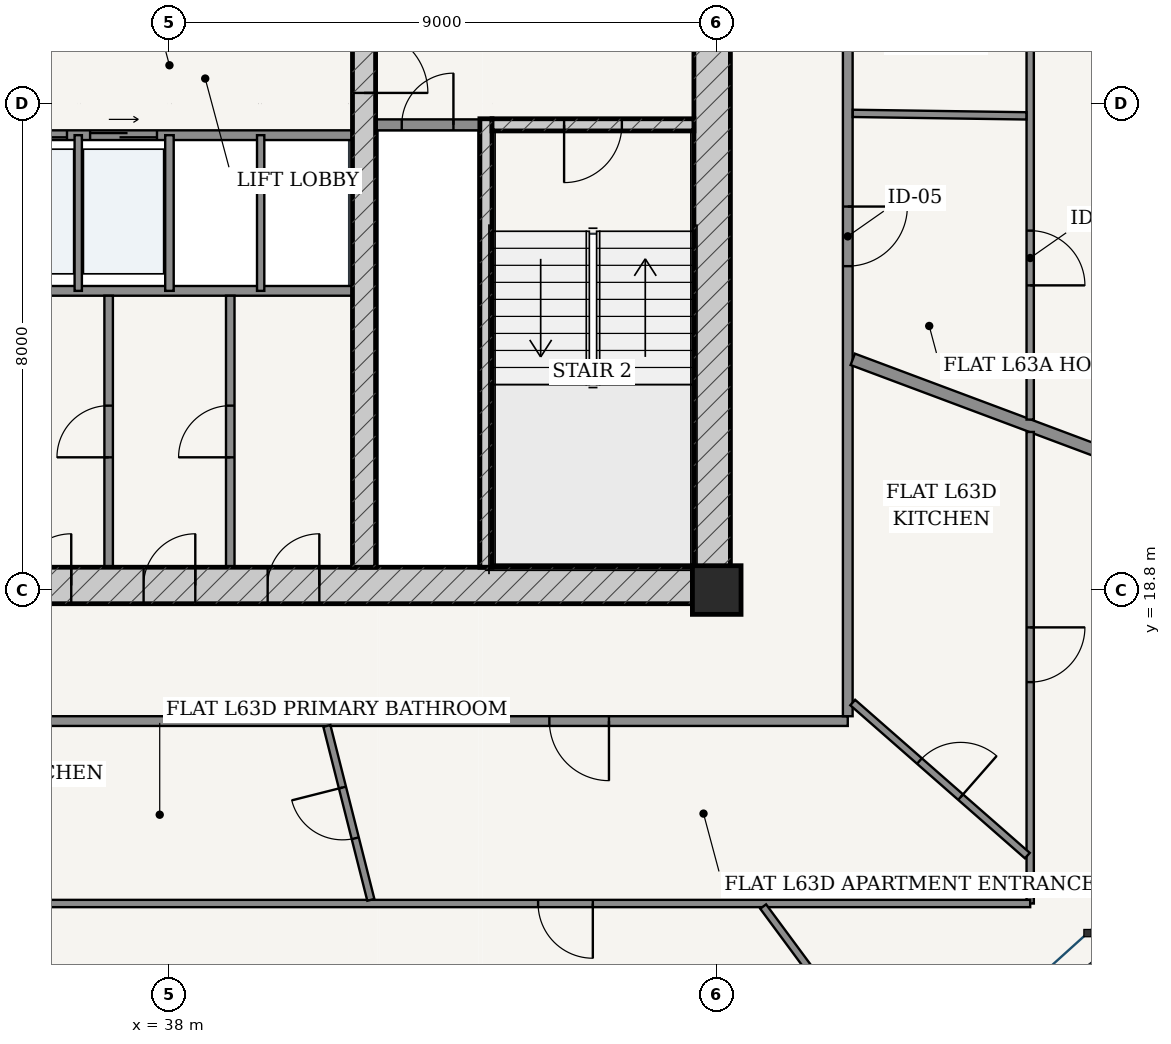
"""IFC4 building model, lengths in metres.
Left out: names, types, materials, properties, quantities, classifications, styles, units other than length and angle.
Written with IfcOpenShell. Run it as: python <this file> out.ifc"""

import sys

from ifc_helpers import new_model, si_unit, direction, frame, frame_2d, origin, origin_2d, place, context, subcontext, project, spatial, rectangle, extrude, source, transform, mapped, element, fill, save


model = new_model("IFC4")
c1 = context("Model", 3, precision=1e-05, world=origin(), true_north=direction((-0.2419218956, 0.970295726276)))
c2 = subcontext(c1, "Body", "Model", "MODEL_VIEW")
j1 = project(units=[si_unit("LENGTHUNIT", "METRE"), si_unit("PLANEANGLEUNIT", "RADIAN")], contexts=[c1])
p1 = place(None, origin())
s1 = spatial("IfcSite", under=j1, at=p1, CompositionType="ELEMENT")
p2 = place(p1, origin())
s2 = spatial("IfcBuilding", under=s1, at=p2, CompositionType="ELEMENT")
p3 = place(p2, frame((0.0, 0.0, 239.3)))
s3 = spatial("IfcBuildingStorey", under=s2, at=p3, CompositionType="ELEMENT", Elevation=239.3)
p4 = place(p3, frame((47.0, 18.8, 0.0), z_axis=(0.0, 0.0, 1.0), x_axis=(1.0, 0.0, 0.0)))
e1 = element("IfcColumn", 1, at=p4, inside=s3, PredefinedType="COLUMN", context=c2, shape_type="SweptSolid", body=[
    extrude(rectangle(XDim=0.8, YDim=0.8, at=origin_2d()), origin(), (0.0, 0.0, 1.0), 3.7),
])
p5 = place(p3, frame((28.775, 18.875, 0.0), z_axis=(0.0, 0.0, 1.0), x_axis=(1.0, 0.0, 0.0)))
e2 = element("IfcWall", 2, at=p5, inside=s3, PredefinedType="SHEAR", context=c2, shape_type="SweptSolid", body=[
    extrude(rectangle(XDim=18.45, YDim=0.6, at=frame_2d((9.225, 0.0))), origin(), (0.0, 0.0, 1.0), 3.25),
])
p6 = place(p5, frame((6.76, 0.0, 0.0)))
e3 = element("IfcOpeningElement", 3, at=p6, cuts=e2, PredefinedType="OPENING", context=c2, shape_type="SweptSolid", body=[
    extrude(rectangle(XDim=0.85, YDim=2.1, at=frame_2d((0.425, 1.05))), frame((0.0, 0.31, 0.0), z_axis=(0.0, -1.0, 0.0), x_axis=(1.0, 0.0, 0.0)), (0.0, 0.0, 1.0), 0.62),
])
p7 = place(p5, frame((8.8, 0.0, 0.0)))
e4 = element("IfcOpeningElement", 4, at=p7, cuts=e2, PredefinedType="OPENING", context=c2, shape_type="SweptSolid", body=[
    extrude(rectangle(XDim=0.85, YDim=2.1, at=frame_2d((0.425, 1.05))), frame((0.0, 0.31, 0.0), z_axis=(0.0, -1.0, 0.0), x_axis=(1.0, 0.0, 0.0)), (0.0, 0.0, 1.0), 0.62),
])
p8 = place(p5, frame((10.84, 0.0, 0.0)))
e5 = element("IfcOpeningElement", 5, at=p8, cuts=e2, PredefinedType="OPENING", context=c2, shape_type="SweptSolid", body=[
    extrude(rectangle(XDim=0.85, YDim=2.1, at=frame_2d((0.425, 1.05))), frame((0.0, 0.31, 0.0), z_axis=(0.0, -1.0, 0.0), x_axis=(1.0, 0.0, 0.0)), (0.0, 0.0, 1.0), 0.62),
])
p9 = place(p3, frame((46.925, 19.175, 0.0), z_axis=(0.0, 0.0, 1.0), x_axis=(0.0, 1.0, 0.0)))
e6 = element("IfcWall", 6, at=p9, inside=s3, PredefinedType="SHEAR", context=c2, shape_type="SweptSolid", body=[
    extrude(rectangle(XDim=15.25, YDim=0.6, at=frame_2d((7.625, 0.0))), origin(), (0.0, 0.0, 1.0), 3.25),
])
p10 = place(p9, frame((9.875, 0.0, 0.0)))
e7 = element("IfcOpeningElement", 7, at=p10, cuts=e6, PredefinedType="OPENING", context=c2, shape_type="SweptSolid", body=[
    extrude(rectangle(XDim=1.5, YDim=2.2, at=frame_2d((0.75, 1.1))), frame((0.0, 0.31, 0.0), z_axis=(0.0, -1.0, 0.0), x_axis=(1.0, 0.0, 0.0)), (0.0, 0.0, 1.0), 0.62),
])
p11 = place(p3, frame((43.205, 19.175, 0.0), z_axis=(0.0, 0.0, 1.0), x_axis=(0.0, 1.0, 0.0)))
e8 = element("IfcWall", 8, at=p11, inside=s3, PredefinedType="SOLIDWALL", context=c2, shape_type="SweptSolid", body=[
    extrude(rectangle(XDim=7.375, YDim=0.2, at=frame_2d((3.688, 0.0))), origin(), (0.0, 0.0, 1.0), 3.25),
])
p12 = place(p3, frame((43.305, 26.45, 0.0), z_axis=(0.0, 0.0, 1.0), x_axis=(1.0, 0.0, 0.0)))
e9 = element("IfcWall", 9, at=p12, inside=s3, PredefinedType="SOLIDWALL", context=c2, shape_type="SweptSolid", body=[
    extrude(rectangle(XDim=3.32, YDim=0.2, at=frame_2d((1.66, 0.0))), origin(), (0.0, 0.0, 1.0), 3.25),
])
p13 = place(p12, frame((1.185, 0.0, 0.0)))
e10 = element("IfcOpeningElement", 10, at=p13, cuts=e9, PredefinedType="OPENING", context=c2, shape_type="SweptSolid", body=[
    extrude(rectangle(XDim=0.95, YDim=2.15, at=frame_2d((0.475, 1.075))), frame((0.0, 0.11, 0.0), z_axis=(0.0, -1.0, 0.0), x_axis=(1.0, 0.0, 0.0)), (0.0, 0.0, 1.0), 0.22),
])
p14 = place(p3, frame((41.2, 19.175, 0.0), z_axis=(0.0, 0.0, 1.0), x_axis=(0.0, 1.0, 0.0)))
e11 = element("IfcWall", 11, at=p14, inside=s3, PredefinedType="SHEAR", context=c2, shape_type="SweptSolid", body=[
    extrude(rectangle(XDim=15.25, YDim=0.38, at=frame_2d((7.625, 0.0))), origin(), (0.0, 0.0, 1.0), 3.25),
])
p15 = place(p14, frame((7.8, 0.0, 0.0)))
e12 = element("IfcOpeningElement", 12, at=p15, cuts=e11, PredefinedType="OPENING", context=c2, shape_type="SweptSolid", body=[
    extrude(rectangle(XDim=1.05, YDim=2.15, at=frame_2d((0.525, 1.075))), frame((0.0, 0.2, 0.0), z_axis=(0.0, -1.0, 0.0), x_axis=(1.0, 0.0, 0.0)), (0.0, 0.0, 1.0), 0.4),
])
p16 = place(p3, frame((41.39, 26.45, 0.0), z_axis=(0.0, 0.0, 1.0), x_axis=(1.0, 0.0, 0.0)))
e13 = element("IfcWall", 13, at=p16, inside=s3, PredefinedType="PARTITIONING", context=c2, shape_type="SweptSolid", body=[
    extrude(rectangle(XDim=1.71, YDim=0.18, at=frame_2d((0.855, 0.0))), origin(), (0.0, 0.0, 1.0), 3.25),
])
p17 = place(p16, frame((0.43, 0.0, 0.0)))
e14 = element("IfcOpeningElement", 14, at=p17, cuts=e13, PredefinedType="OPENING", context=c2, shape_type="SweptSolid", body=[
    extrude(rectangle(XDim=0.85, YDim=2.1, at=frame_2d((0.425, 1.05))), frame((0.0, 0.1, 0.0), z_axis=(0.0, -1.0, 0.0), x_axis=(1.0, 0.0, 0.0)), (0.0, 0.0, 1.0), 0.2),
])
p18 = place(p3, frame((34.99, 26.28, 0.0), z_axis=(0.0, 0.0, 1.0), x_axis=(1.0, 0.0, 0.0)))
e15 = element("IfcWall", 15, at=p18, inside=s3, PredefinedType="PARTITIONING", context=c2, shape_type="SweptSolid", body=[
    extrude(rectangle(XDim=6.02, YDim=0.16, at=frame_2d((3.01, 0.0))), origin(), (0.0, 0.0, 1.0), 3.25),
])
p19 = place(p18, frame((0.225, 0.0, 0.0)))
e16 = element("IfcOpeningElement", 16, at=p19, cuts=e15, PredefinedType="OPENING", context=c2, shape_type="SweptSolid", body=[
    extrude(rectangle(XDim=1.1, YDim=2.2, at=frame_2d((0.55, 1.1))), frame((0.0, 0.09, 0.0), z_axis=(0.0, -1.0, 0.0), x_axis=(1.0, 0.0, 0.0)), (0.0, 0.0, 1.0), 0.18),
])
p20 = place(p18, frame((1.705, 0.0, 0.0)))
e17 = element("IfcOpeningElement", 17, at=p20, cuts=e15, PredefinedType="OPENING", context=c2, shape_type="SweptSolid", body=[
    extrude(rectangle(XDim=1.1, YDim=2.2, at=frame_2d((0.55, 1.1))), frame((0.0, 0.09, 0.0), z_axis=(0.0, -1.0, 0.0), x_axis=(1.0, 0.0, 0.0)), (0.0, 0.0, 1.0), 0.18),
])
p21 = place(p3, frame((34.99, 23.72, 0.0), z_axis=(0.0, 0.0, 1.0), x_axis=(1.0, 0.0, 0.0)))
e18 = element("IfcWall", 18, at=p21, inside=s3, PredefinedType="PARTITIONING", context=c2, shape_type="SweptSolid", body=[
    extrude(rectangle(XDim=6.02, YDim=0.16, at=frame_2d((3.01, 0.0))), origin(), (0.0, 0.0, 1.0), 3.25),
])
p22 = place(p3, frame((36.5, 23.72, 0.0), z_axis=(0.0, 0.0, 1.0), x_axis=(0.0, 1.0, 0.0)))
e19 = element("IfcWall", 19, at=p22, inside=s3, PredefinedType="PARTITIONING", context=c2, shape_type="SweptSolid", body=[
    extrude(rectangle(XDim=2.56, YDim=0.12, at=frame_2d((1.28, 0.0))), origin(), (0.0, 0.0, 1.0), 3.25),
])
p23 = place(p3, frame((38.0, 23.72, 0.0), z_axis=(0.0, 0.0, 1.0), x_axis=(0.0, 1.0, 0.0)))
e20 = element("IfcWall", 20, at=p23, inside=s3, PredefinedType="PARTITIONING", context=c2, shape_type="SweptSolid", body=[
    extrude(rectangle(XDim=2.56, YDim=0.14, at=frame_2d((1.28, 0.0))), origin(), (0.0, 0.0, 1.0), 3.25),
])
p24 = place(p3, frame((39.5, 23.72, 0.0), z_axis=(0.0, 0.0, 1.0), x_axis=(0.0, 1.0, 0.0)))
e21 = element("IfcWall", 21, at=p24, inside=s3, PredefinedType="PARTITIONING", context=c2, shape_type="SweptSolid", body=[
    extrude(rectangle(XDim=2.56, YDim=0.12, at=frame_2d((1.28, 0.0))), origin(), (0.0, 0.0, 1.0), 3.25),
])
p25 = place(p3, frame((37.0, 19.175, 0.0), z_axis=(0.0, 0.0, 1.0), x_axis=(0.0, 1.0, 0.0)))
e22 = element("IfcWall", 22, at=p25, inside=s3, PredefinedType="PARTITIONING", context=c2, shape_type="SweptSolid", body=[
    extrude(rectangle(XDim=4.465, YDim=0.14, at=frame_2d((2.232, 0.0))), origin(), (0.0, 0.0, 1.0), 3.25),
])
p26 = place(p25, frame((1.808, 0.0, 0.0)))
e23 = element("IfcOpeningElement", 23, at=p26, cuts=e22, PredefinedType="OPENING", context=c2, shape_type="SweptSolid", body=[
    extrude(rectangle(XDim=0.85, YDim=2.1, at=frame_2d((0.425, 1.05))), frame((0.0, 0.08, 0.0), z_axis=(0.0, -1.0, 0.0), x_axis=(1.0, 0.0, 0.0)), (0.0, 0.0, 1.0), 0.16),
])
p27 = place(p3, frame((39.0, 19.175, 0.0), z_axis=(0.0, 0.0, 1.0), x_axis=(0.0, 1.0, 0.0)))
e24 = element("IfcWall", 24, at=p27, inside=s3, PredefinedType="PARTITIONING", context=c2, shape_type="SweptSolid", body=[
    extrude(rectangle(XDim=4.465, YDim=0.14, at=frame_2d((2.232, 0.0))), origin(), (0.0, 0.0, 1.0), 3.25),
])
p28 = place(p27, frame((1.808, 0.0, 0.0)))
e25 = element("IfcOpeningElement", 25, at=p28, cuts=e24, PredefinedType="OPENING", context=c2, shape_type="SweptSolid", body=[
    extrude(rectangle(XDim=0.85, YDim=2.1, at=frame_2d((0.425, 1.05))), frame((0.0, 0.08, 0.0), z_axis=(0.0, -1.0, 0.0), x_axis=(1.0, 0.0, 0.0)), (0.0, 0.0, 1.0), 0.16),
])
p29 = place(p3, frame((34.32, 16.645, 0.0), z_axis=(0.0, 0.0, 1.0), x_axis=(1.0, 0.0, 0.0)))
e26 = element("IfcWall", 26, at=p29, inside=s3, PredefinedType="PARTITIONING", context=c2, shape_type="SweptSolid", body=[
    extrude(rectangle(XDim=14.835, YDim=0.16, at=frame_2d((7.417, 0.0))), origin(), (0.0, 0.0, 1.0), 2.775),
])
p30 = place(p29, frame((9.928, 0.0, 0.0)))
e27 = element("IfcOpeningElement", 27, at=p30, cuts=e26, PredefinedType="OPENING", context=c2, shape_type="SweptSolid", body=[
    extrude(rectangle(XDim=0.98, YDim=2.2, at=frame_2d((0.49, 1.1))), frame((0.0, 0.09, 0.0), z_axis=(0.0, -1.0, 0.0), x_axis=(1.0, 0.0, 0.0)), (0.0, 0.0, 1.0), 0.18),
])
p31 = place(p3, frame((49.155, 16.725, 0.0), z_axis=(0.0, 0.0, 1.0), x_axis=(0.0, 1.0, 0.0)))
e28 = element("IfcWall", 28, at=p31, inside=s3, PredefinedType="PARTITIONING", context=c2, shape_type="SweptSolid", body=[
    extrude(rectangle(XDim=18.3, YDim=0.16, at=frame_2d((9.15, 0.0))), origin(), (0.0, 0.0, 1.0), 2.775),
])
p32 = place(p31, frame((7.401, 0.0, 0.0)))
e29 = element("IfcOpeningElement", 29, at=p32, cuts=e28, PredefinedType="OPENING", context=c2, shape_type="SweptSolid", body=[
    extrude(rectangle(XDim=0.98, YDim=2.2, at=frame_2d((0.49, 1.1))), frame((0.0, 0.09, 0.0), z_axis=(0.0, -1.0, 0.0), x_axis=(1.0, 0.0, 0.0)), (0.0, 0.0, 1.0), 0.18),
])
p33 = place(p3, frame((49.237, 22.594, 0.0), z_axis=(0.0, 0.0, 1.0), x_axis=(0.936534016635, -0.350576718687, 0.0)))
e30 = element("IfcWall", 30, at=p33, inside=s3, PredefinedType="PARTITIONING", context=c2, shape_type="SweptSolid", body=[
    extrude(rectangle(XDim=9.446, YDim=0.2, at=frame_2d((4.723, 0.0))), origin(), (0.0, 0.0, 1.0), 2.881),
])
p34 = place(p3, frame((52.155, 38.105, 0.0), z_axis=(0.0, 0.0, 1.0), x_axis=(0.0, -1.0, 0.0)))
e31 = element("IfcWall", 31, at=p34, inside=s3, PredefinedType="PARTITIONING", context=c2, shape_type="SweptSolid", body=[
    extrude(rectangle(XDim=16.501, YDim=0.12, at=frame_2d((8.251, 0.0))), origin(), (0.0, 0.0, 1.0), 2.775),
])
p35 = place(p34, frame((13.395, 0.0, 0.0)))
e32 = element("IfcOpeningElement", 32, at=p35, cuts=e31, PredefinedType="OPENING", context=c2, shape_type="SweptSolid", body=[
    extrude(rectangle(XDim=0.9, YDim=2.15, at=frame_2d((0.45, 1.075))), frame((0.0, 0.07, 0.0), z_axis=(0.0, -1.0, 0.0), x_axis=(1.0, 0.0, 0.0)), (0.0, 0.0, 1.0), 0.14),
])
p36 = place(p34, frame((7.467, 0.0, 0.0)))
e33 = element("IfcOpeningElement", 33, at=p36, cuts=e31, PredefinedType="OPENING", context=c2, shape_type="SweptSolid", body=[
    extrude(rectangle(XDim=0.9, YDim=2.15, at=frame_2d((0.45, 1.075))), frame((0.0, 0.07, 0.0), z_axis=(0.0, -1.0, 0.0), x_axis=(1.0, 0.0, 0.0)), (0.0, 0.0, 1.0), 0.14),
])
p37 = place(p3, frame((49.237, 26.639, 0.0), z_axis=(0.0, 0.0, 1.0), x_axis=(0.999896890624, -0.014359948506, 0.0)))
e34 = element("IfcWall", 34, at=p37, inside=s3, PredefinedType="PARTITIONING", context=c2, shape_type="SweptSolid", body=[
    extrude(rectangle(XDim=2.856, YDim=0.12, at=frame_2d((1.428, 0.0))), origin(), (0.0, 0.0, 1.0), 2.969),
])
p38 = place(p3, frame((52.155, 21.4, 0.0), z_axis=(0.0, 0.0, 1.0), x_axis=(0.0, -1.0, 0.0)))
e35 = element("IfcWall", 35, at=p38, inside=s3, PredefinedType="PARTITIONING", context=c2, shape_type="SweptSolid", body=[
    extrude(rectangle(XDim=7.755, YDim=0.12, at=frame_2d((3.877, 0.0))), origin(), (0.0, 0.0, 1.0), 2.775),
])
p39 = place(p38, frame((3.214, 0.0, 0.0)))
e36 = element("IfcOpeningElement", 36, at=p39, cuts=e35, PredefinedType="OPENING", context=c2, shape_type="SweptSolid", body=[
    extrude(rectangle(XDim=0.9, YDim=2.15, at=frame_2d((0.45, 1.075))), frame((0.0, 0.07, 0.0), z_axis=(0.0, -1.0, 0.0), x_axis=(1.0, 0.0, 0.0)), (0.0, 0.0, 1.0), 0.14),
])
p40 = place(p3, frame((52.155, 13.645, 0.0), z_axis=(0.0, 0.0, 1.0), x_axis=(-1.0, 0.0, 0.0)))
e37 = element("IfcWall", 37, at=p40, inside=s3, PredefinedType="PARTITIONING", context=c2, shape_type="SweptSolid", body=[
    extrude(rectangle(XDim=16.949, YDim=0.12, at=frame_2d((8.474, 0.0))), origin(), (0.0, 0.0, 1.0), 2.775),
])
p41 = place(p40, frame((7.192, 0.0, 0.0)))
e38 = element("IfcOpeningElement", 38, at=p41, cuts=e37, PredefinedType="OPENING", context=c2, shape_type="SweptSolid", body=[
    extrude(rectangle(XDim=0.9, YDim=2.15, at=frame_2d((0.45, 1.075))), frame((0.0, 0.07, 0.0), z_axis=(0.0, -1.0, 0.0), x_axis=(1.0, 0.0, 0.0)), (0.0, 0.0, 1.0), 0.14),
])
p42 = place(p3, frame((47.764, 13.595, 0.0), z_axis=(0.0, 0.0, 1.0), x_axis=(0.594530312724, -0.804073197696, 0.0)))
e39 = element("IfcWall", 39, at=p42, inside=s3, PredefinedType="PARTITIONING", context=c2, shape_type="SweptSolid", body=[
    extrude(rectangle(XDim=3.845, YDim=0.12, at=frame_2d((1.922, 0.0))), origin(), (0.0, 0.0, 1.0), 2.6),
])
p43 = place(p3, frame((40.589, 16.565, 0.0), z_axis=(0.0, 0.0, 1.0), x_axis=(0.245222005641, -0.969466950416, 0.0)))
e40 = element("IfcWall", 40, at=p43, inside=s3, PredefinedType="PARTITIONING", context=c2, shape_type="SweptSolid", body=[
    extrude(rectangle(XDim=2.95, YDim=0.12, at=frame_2d((1.475, 0.0))), origin(), (0.0, 0.0, 1.0), 2.969),
])
p44 = place(p43, frame((1.045, 0.0, 0.0)))
e41 = element("IfcOpeningElement", 41, at=p44, cuts=e40, PredefinedType="OPENING", context=c2, shape_type="SweptSolid", body=[
    extrude(rectangle(XDim=0.86, YDim=2.15, at=frame_2d((0.43, 1.075))), frame((0.0, 0.07, 0.0), z_axis=(0.0, -1.0, 0.0), x_axis=(1.0, 0.0, 0.0)), (0.0, 0.0, 1.0), 0.14),
])
p45 = place(p3, frame((49.237, 16.95, 0.0), z_axis=(0.0, 0.0, 1.0), x_axis=(0.751994252696, -0.659169662463, 0.0)))
e42 = element("IfcWall", 42, at=p45, inside=s3, PredefinedType="PARTITIONING", context=c2, shape_type="SweptSolid", body=[
    extrude(rectangle(XDim=3.819, YDim=0.12, at=frame_2d((1.909, 0.0))), origin(), (0.0, 0.0, 1.0), 2.881),
])
p46 = place(p45, frame((1.459, 0.0, 0.0)))
e43 = element("IfcOpeningElement", 43, at=p46, cuts=e42, PredefinedType="OPENING", context=c2, shape_type="SweptSolid", body=[
    extrude(rectangle(XDim=0.9, YDim=2.15, at=frame_2d((0.45, 1.075))), frame((0.0, 0.07, 0.0), z_axis=(0.0, -1.0, 0.0), x_axis=(1.0, 0.0, 0.0)), (0.0, 0.0, 1.0), 0.14),
])
m1 = source(origin(), c2, "Body", "SweptSolid", [
    extrude(rectangle(XDim=1.05, YDim=2.15, at=frame_2d((0.525, 1.075))), frame((0.0, 0.025, 0.0), z_axis=(0.0, -1.0, 0.0), x_axis=(1.0, 0.0, 0.0)), (0.0, 0.0, 1.0), 0.05),
])
p47 = place(p15, frame((1.05, 0.0, 0.0), z_axis=(0.0, 0.0, 1.0), x_axis=(-1.0, 0.0, 0.0)))
e44 = element("IfcDoor", 44, at=p47, inside=s3, OperationType="SINGLE_SWING_RIGHT", PredefinedType="DOOR", context=c2, shape_type="MappedRepresentation", body=[
    mapped(m1, transform((0.0, 0.0, 0.0), scale=1.0)),
])
fill(e12, e44)
m2 = source(origin(), c2, "Body", "SweptSolid", [
    extrude(rectangle(XDim=0.95, YDim=2.15, at=frame_2d((0.475, 1.075))), frame((0.0, 0.025, 0.0), z_axis=(0.0, -1.0, 0.0), x_axis=(1.0, 0.0, 0.0)), (0.0, 0.0, 1.0), 0.05),
])
p48 = place(p13, frame((0.95, 0.0, 0.0), z_axis=(0.0, 0.0, 1.0), x_axis=(-1.0, 0.0, 0.0)))
e45 = element("IfcDoor", 45, at=p48, inside=s3, OperationType="SINGLE_SWING_RIGHT", PredefinedType="DOOR", context=c2, shape_type="MappedRepresentation", body=[
    mapped(m2, transform((0.0, 0.0, 0.0), scale=1.0)),
])
fill(e10, e45)
m3 = source(origin(), c2, "Body", "SweptSolid", [
    extrude(rectangle(XDim=0.85, YDim=2.1, at=frame_2d((0.425, 1.05))), frame((0.0, 0.025, 0.0), z_axis=(0.0, -1.0, 0.0), x_axis=(1.0, 0.0, 0.0)), (0.0, 0.0, 1.0), 0.05),
])
p49 = place(p17, origin())
e46 = element("IfcDoor", 46, at=p49, inside=s3, OperationType="SINGLE_SWING_RIGHT", PredefinedType="DOOR", context=c2, shape_type="MappedRepresentation", body=[
    mapped(m3, transform((0.0, 0.0, 0.0), scale=1.0)),
])
fill(e14, e46)
p50 = place(p6, origin())
e47 = element("IfcDoor", 47, at=p50, inside=s3, OperationType="SINGLE_SWING_RIGHT", PredefinedType="DOOR", context=c2, shape_type="MappedRepresentation", body=[
    mapped(m3, transform((0.0, 0.0, 0.0), scale=1.0)),
])
fill(e3, e47)
p51 = place(p7, origin())
e48 = element("IfcDoor", 48, at=p51, inside=s3, OperationType="SINGLE_SWING_RIGHT", PredefinedType="DOOR", context=c2, shape_type="MappedRepresentation", body=[
    mapped(m3, transform((0.0, 0.0, 0.0), scale=1.0)),
])
fill(e4, e48)
p52 = place(p8, origin())
e49 = element("IfcDoor", 49, at=p52, inside=s3, OperationType="SINGLE_SWING_RIGHT", PredefinedType="DOOR", context=c2, shape_type="MappedRepresentation", body=[
    mapped(m3, transform((0.0, 0.0, 0.0), scale=1.0)),
])
fill(e5, e49)
p53 = place(p26, origin())
e50 = element("IfcDoor", 50, at=p53, inside=s3, OperationType="SINGLE_SWING_LEFT", PredefinedType="DOOR", context=c2, shape_type="MappedRepresentation", body=[
    mapped(m3, transform((0.0, 0.0, 0.0), scale=1.0)),
])
fill(e23, e50)
p54 = place(p28, origin())
e51 = element("IfcDoor", 51, at=p54, inside=s3, OperationType="SINGLE_SWING_LEFT", PredefinedType="DOOR", context=c2, shape_type="MappedRepresentation", body=[
    mapped(m3, transform((0.0, 0.0, 0.0), scale=1.0)),
])
fill(e25, e51)
m4 = source(origin(), c2, "Body", "SweptSolid", [
    extrude(rectangle(XDim=1.1, YDim=2.2, at=frame_2d((0.55, 1.1))), frame((0.0, 0.025, 0.0), z_axis=(0.0, -1.0, 0.0), x_axis=(1.0, 0.0, 0.0)), (0.0, 0.0, 1.0), 0.05),
])
p55 = place(p19, origin())
e52 = element("IfcDoor", 52, at=p55, inside=s3, OperationType="DOUBLE_DOOR_SLIDING", PredefinedType="DOOR", context=c2, shape_type="MappedRepresentation", body=[
    mapped(m4, transform((0.0, 0.0, 0.0), scale=1.0)),
])
fill(e16, e52)
p56 = place(p20, origin())
e53 = element("IfcDoor", 53, at=p56, inside=s3, OperationType="DOUBLE_DOOR_SLIDING", PredefinedType="DOOR", context=c2, shape_type="MappedRepresentation", body=[
    mapped(m4, transform((0.0, 0.0, 0.0), scale=1.0)),
])
fill(e17, e53)
m5 = source(origin(), c2, "Body", "SweptSolid", [
    extrude(rectangle(XDim=0.98, YDim=2.2, at=frame_2d((0.49, 1.1))), frame((0.0, 0.025, 0.0), z_axis=(0.0, -1.0, 0.0), x_axis=(1.0, 0.0, 0.0)), (0.0, 0.0, 1.0), 0.05),
])
p57 = place(p32, frame((0.98, 0.0, 0.0), z_axis=(0.0, 0.0, 1.0), x_axis=(-1.0, 0.0, 0.0)))
e54 = element("IfcDoor", 54, at=p57, inside=s3, OperationType="SINGLE_SWING_LEFT", PredefinedType="DOOR", context=c2, shape_type="MappedRepresentation", body=[
    mapped(m5, transform((0.0, 0.0, 0.0), scale=1.0)),
])
fill(e29, e54)
m6 = source(origin(), c2, "Body", "SweptSolid", [
    extrude(rectangle(XDim=0.9, YDim=2.15, at=frame_2d((0.45, 1.075))), frame((0.0, 0.025, 0.0), z_axis=(0.0, -1.0, 0.0), x_axis=(1.0, 0.0, 0.0)), (0.0, 0.0, 1.0), 0.05),
])
p58 = place(p35, origin())
e55 = element("IfcDoor", 55, at=p58, inside=s3, OperationType="SINGLE_SWING_RIGHT", PredefinedType="DOOR", context=c2, shape_type="MappedRepresentation", body=[
    mapped(m6, transform((0.0, 0.0, 0.0), scale=1.0)),
])
fill(e32, e55)
p59 = place(p30, frame((0.98, 0.0, 0.0), z_axis=(0.0, 0.0, 1.0), x_axis=(-1.0, 0.0, 0.0)))
e56 = element("IfcDoor", 56, at=p59, inside=s3, OperationType="SINGLE_SWING_LEFT", PredefinedType="DOOR", context=c2, shape_type="MappedRepresentation", body=[
    mapped(m5, transform((0.0, 0.0, 0.0), scale=1.0)),
])
fill(e27, e56)
m7 = source(origin(), c2, "Body", "SweptSolid", [
    extrude(rectangle(XDim=0.86, YDim=2.15, at=frame_2d((0.43, 1.075))), frame((0.0, 0.025, 0.0), z_axis=(0.0, -1.0, 0.0), x_axis=(1.0, 0.0, 0.0)), (0.0, 0.0, 1.0), 0.05),
])
p60 = place(p44, frame((0.86, 0.0, 0.0), z_axis=(0.0, 0.0, 1.0), x_axis=(-1.0, 0.0, 0.0)))
e57 = element("IfcDoor", 57, at=p60, inside=s3, OperationType="SINGLE_SWING_RIGHT", PredefinedType="DOOR", context=c2, shape_type="MappedRepresentation", body=[
    mapped(m7, transform((0.0, 0.0, 0.0), scale=1.0)),
])
fill(e41, e57)
p61 = place(p41, origin())
e58 = element("IfcDoor", 58, at=p61, inside=s3, OperationType="SINGLE_SWING_LEFT", PredefinedType="DOOR", context=c2, shape_type="MappedRepresentation", body=[
    mapped(m6, transform((0.0, 0.0, 0.0), scale=1.0)),
])
fill(e38, e58)
p62 = place(p46, origin())
e59 = element("IfcDoor", 59, at=p62, inside=s3, OperationType="SINGLE_SWING_RIGHT", PredefinedType="DOOR", context=c2, shape_type="MappedRepresentation", body=[
    mapped(m6, transform((0.0, 0.0, 0.0), scale=1.0)),
])
fill(e43, e59)
p63 = place(p39, origin())
e60 = element("IfcDoor", 60, at=p63, inside=s3, OperationType="SINGLE_SWING_LEFT", PredefinedType="DOOR", context=c2, shape_type="MappedRepresentation", body=[
    mapped(m6, transform((0.0, 0.0, 0.0), scale=1.0)),
])
fill(e36, e60)
save(model, sys.argv[1])
